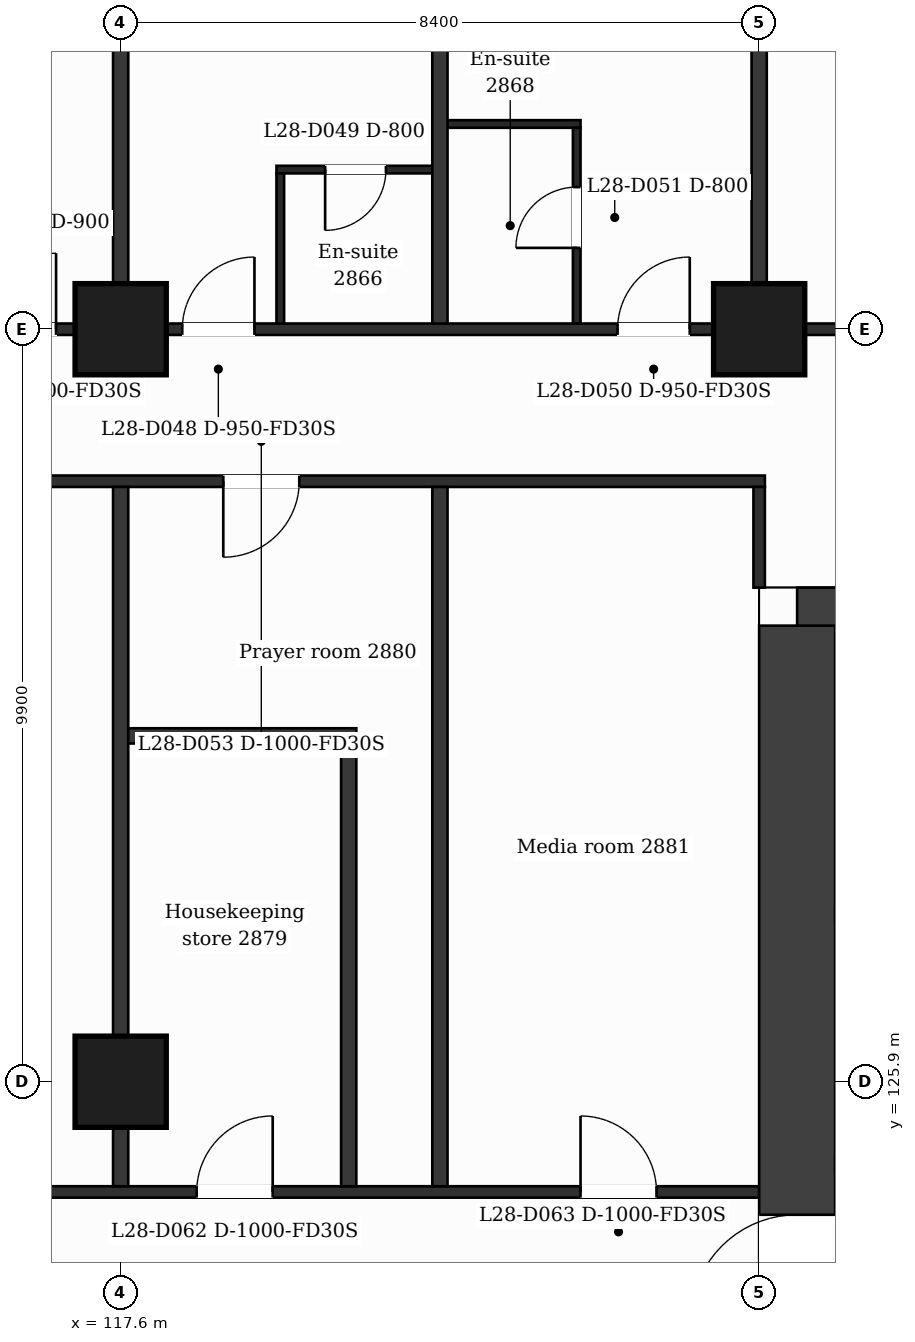
"""IFC4 building model, lengths in metres.
Left out: names, types, materials, properties, quantities, classifications, styles, units other than length and angle.
Written with IfcOpenShell. Run it as: python <this file> out.ifc"""

import sys

from ifc_helpers import new_model, si_unit, direction, frame, frame_2d, origin, origin_2d, place, context, subcontext, project, spatial, rectangle, extrude, element, fill, save


model = new_model("IFC4")
c1 = context("Model", 3, precision=1e-05, world=origin(), true_north=direction((0.0, 1.0)))
c2 = subcontext(c1, "Body", "Model", "MODEL_VIEW")
j1 = project(units=[si_unit("LENGTHUNIT", "METRE"), si_unit("PLANEANGLEUNIT", "RADIAN")], contexts=[c1])
p1 = place(None, origin())
s1 = spatial("IfcSite", under=j1, at=p1, CompositionType="ELEMENT")
p2 = place(p1, origin())
s2 = spatial("IfcBuilding", under=s1, at=p2, CompositionType="ELEMENT")
p3 = place(p2, frame((0.0, 0.0, 120.6)))
s3 = spatial("IfcBuildingStorey", under=s2, at=p3, CompositionType="ELEMENT", Elevation=120.6)
p4 = place(p3, frame((126.5, 131.9, 0.0), z_axis=(0.0, 0.0, 1.0), x_axis=(1.0, 0.0, 0.0)))
e1 = element("IfcWall", 1, at=p4, inside=s3, PredefinedType="SHEAR", context=c2, shape_type="SweptSolid", body=[
    extrude(rectangle(XDim=11.232, YDim=1.0, at=frame_2d((5.616, 0.0))), origin(), (0.0, 0.0, 1.0), 3.7),
])
p5 = place(p4, frame((3.386, 0.0, 0.0)))
e2 = element("IfcOpeningElement", 2, at=p5, cuts=e1, PredefinedType="OPENING", context=c2, shape_type="SweptSolid", body=[
    extrude(rectangle(XDim=1.2, YDim=2.1, at=frame_2d((0.6, 1.05))), frame((0.0, 0.51, 0.0), z_axis=(0.0, -1.0, 0.0), x_axis=(1.0, 0.0, 0.0)), (0.0, 0.0, 1.0), 1.02),
])
p6 = place(p3, frame((126.5, 110.9, 0.0), z_axis=(0.0, 0.0, 1.0), x_axis=(0.0, 1.0, 0.0)))
e3 = element("IfcWall", 3, at=p6, inside=s3, PredefinedType="SHEAR", context=c2, shape_type="SweptSolid", body=[
    extrude(rectangle(XDim=21.0, YDim=1.0, at=frame_2d((10.5, 0.0))), origin(), (0.0, 0.0, 1.0), 3.7),
])
p7 = place(p6, frame((11.85, 0.0, 0.0)))
e4 = element("IfcOpeningElement", 4, at=p7, cuts=e3, PredefinedType="OPENING", context=c2, shape_type="SweptSolid", body=[
    extrude(rectangle(XDim=1.4, YDim=2.1, at=frame_2d((0.7, 1.05))), frame((0.0, 0.51, 0.0), z_axis=(0.0, -1.0, 0.0), x_axis=(1.0, 0.0, 0.0)), (0.0, 0.0, 1.0), 1.02),
])
for number, where, z_axis, x_axis in (
    (5, (117.6, 125.9, 0.0), (0.0, 0.0, 1.0), (1.0, 0.0, 0.0)),
    (6, (117.6, 135.8, 0.0), (0.0, 0.0, 1.0), (1.0, 0.0, 0.0)),
    (7, (126.0, 135.8, 0.0), (0.0, 0.0, 1.0), (1.0, 0.0, 0.0)),
):
    element("IfcColumn", number, at=place(p3, frame(where, z_axis=z_axis, x_axis=x_axis)), inside=s3, PredefinedType="COLUMN", context=c2, shape_type="SweptSolid", body=[
        extrude(rectangle(XDim=1.2, YDim=1.2, at=origin_2d()), origin(), (0.0, 0.0, 1.0), 3.7),
    ])
p8 = place(p3, frame((100.8, 124.45, 0.0), z_axis=(0.0, 0.0, 1.0), x_axis=(1.0, 0.0, 0.0)))
e8 = element("IfcWall", 8, at=p8, inside=s3, PredefinedType="PARTITIONING", context=c2, shape_type="SweptSolid", body=[
    extrude(rectangle(XDim=25.2, YDim=0.15, at=frame_2d((12.6, 0.0))), origin(), (0.0, 0.0, 1.0), 3.38),
])
p9 = place(p8, frame((1.85, 0.0, 0.0)))
e9 = element("IfcOpeningElement", 9, at=p9, cuts=e8, PredefinedType="OPENING", context=c2, shape_type="SweptSolid", body=[
    extrude(rectangle(XDim=1.0, YDim=2.1, at=frame_2d((0.5, 1.05))), frame((0.0, 0.085, 0.0), z_axis=(0.0, -1.0, 0.0), x_axis=(1.0, 0.0, 0.0)), (0.0, 0.0, 1.0), 0.17),
])
p10 = place(p8, frame((6.425, 0.0, 0.0)))
e10 = element("IfcOpeningElement", 10, at=p10, cuts=e8, PredefinedType="OPENING", context=c2, shape_type="SweptSolid", body=[
    extrude(rectangle(XDim=1.0, YDim=2.1, at=frame_2d((0.5, 1.05))), frame((0.0, 0.085, 0.0), z_axis=(0.0, -1.0, 0.0), x_axis=(1.0, 0.0, 0.0)), (0.0, 0.0, 1.0), 0.17),
])
p11 = place(p8, frame((12.77, 0.0, 0.0)))
e11 = element("IfcOpeningElement", 11, at=p11, cuts=e8, PredefinedType="OPENING", context=c2, shape_type="SweptSolid", body=[
    extrude(rectangle(XDim=1.0, YDim=2.1, at=frame_2d((0.5, 1.05))), frame((0.0, 0.085, 0.0), z_axis=(0.0, -1.0, 0.0), x_axis=(1.0, 0.0, 0.0)), (0.0, 0.0, 1.0), 0.17),
])
p12 = place(p8, frame((17.8, 0.0, 0.0)))
e12 = element("IfcOpeningElement", 12, at=p12, cuts=e8, PredefinedType="OPENING", context=c2, shape_type="SweptSolid", body=[
    extrude(rectangle(XDim=1.0, YDim=2.1, at=frame_2d((0.5, 1.05))), frame((0.0, 0.085, 0.0), z_axis=(0.0, -1.0, 0.0), x_axis=(1.0, 0.0, 0.0)), (0.0, 0.0, 1.0), 0.17),
])
p13 = place(p8, frame((22.85, 0.0, 0.0)))
e13 = element("IfcOpeningElement", 13, at=p13, cuts=e8, PredefinedType="OPENING", context=c2, shape_type="SweptSolid", body=[
    extrude(rectangle(XDim=1.0, YDim=2.1, at=frame_2d((0.5, 1.05))), frame((0.0, 0.085, 0.0), z_axis=(0.0, -1.0, 0.0), x_axis=(1.0, 0.0, 0.0)), (0.0, 0.0, 1.0), 0.17),
])
p14 = place(p3, frame((127.0, 124.8, 0.0), z_axis=(0.0, 0.0, 1.0), x_axis=(1.0, 0.0, 0.0)))
e14 = element("IfcWall", 14, at=p14, inside=s3, PredefinedType="PARTITIONING", context=c2, shape_type="SweptSolid", body=[
    extrude(rectangle(XDim=4.649, YDim=0.2, at=frame_2d((2.324, 0.0))), origin(), (0.0, 0.0, 1.0), 3.38),
])
p15 = place(p14, frame((0.743, 0.0, 0.0)))
e15 = element("IfcOpeningElement", 15, at=p15, cuts=e14, PredefinedType="OPENING", context=c2, shape_type="SweptSolid", body=[
    extrude(rectangle(XDim=1.1, YDim=2.1, at=frame_2d((0.55, 1.05))), frame((0.0, 0.11, 0.0), z_axis=(0.0, -1.0, 0.0), x_axis=(1.0, 0.0, 0.0)), (0.0, 0.0, 1.0), 0.22),
])
p16 = place(p3, frame((127.0, 128.1, 0.0), z_axis=(0.0, 0.0, 1.0), x_axis=(1.0, 0.0, 0.0)))
e16 = element("IfcWall", 16, at=p16, inside=s3, PredefinedType="PARTITIONING", context=c2, shape_type="SweptSolid", body=[
    extrude(rectangle(XDim=4.649, YDim=0.2, at=frame_2d((2.324, 0.0))), origin(), (0.0, 0.0, 1.0), 3.38),
])
p17 = place(p16, frame((2.805, 0.0, 0.0)))
e17 = element("IfcOpeningElement", 17, at=p17, cuts=e16, PredefinedType="OPENING", context=c2, shape_type="SweptSolid", body=[
    extrude(rectangle(XDim=1.1, YDim=2.1, at=frame_2d((0.55, 1.05))), frame((0.0, 0.11, 0.0), z_axis=(0.0, -1.0, 0.0), x_axis=(1.0, 0.0, 0.0)), (0.0, 0.0, 1.0), 0.22),
])
p18 = place(p3, frame((117.6, 130.45, 0.0), z_axis=(0.0, 0.0, 1.0), x_axis=(1.0, 0.0, 0.0)))
e18 = element("IfcWall", 18, at=p18, inside=s3, PredefinedType="PARTITIONING", context=c2, shape_type="SweptSolid", body=[
    extrude(rectangle(XDim=3.1, YDim=0.2, at=frame_2d((1.55, 0.0))), origin(), (0.0, 0.0, 1.0), 3.38),
])
p19 = place(p3, frame((100.725, 133.8, 0.0), z_axis=(0.0, 0.0, 1.0), x_axis=(1.0, 0.0, 0.0)))
e19 = element("IfcWall", 19, at=p19, inside=s3, PredefinedType="PARTITIONING", context=c2, shape_type="SweptSolid", body=[
    extrude(rectangle(XDim=25.35, YDim=0.15, at=frame_2d((12.675, 0.0))), origin(), (0.0, 0.0, 1.0), 3.38),
])
p20 = place(p19, frame((18.225, 0.0, 0.0)))
e20 = element("IfcOpeningElement", 20, at=p20, cuts=e19, PredefinedType="OPENING", context=c2, shape_type="SweptSolid", body=[
    extrude(rectangle(XDim=1.0, YDim=2.1, at=frame_2d((0.5, 1.05))), frame((0.0, 0.085, 0.0), z_axis=(0.0, -1.0, 0.0), x_axis=(1.0, 0.0, 0.0)), (0.0, 0.0, 1.0), 0.17),
])
p21 = place(p3, frame((90.895, 135.8, 0.0), z_axis=(0.0, 0.0, 1.0), x_axis=(1.0, 0.0, 0.0)))
e21 = element("IfcWall", 21, at=p21, inside=s3, PredefinedType="PARTITIONING", context=c2, shape_type="SweptSolid", body=[
    extrude(rectangle(XDim=45.011, YDim=0.15, at=frame_2d((22.505, 0.0))), origin(), (0.0, 0.0, 1.0), 3.38),
])
p22 = place(p21, frame((8.005, 0.0, 0.0)))
e22 = element("IfcOpeningElement", 22, at=p22, cuts=e21, PredefinedType="OPENING", context=c2, shape_type="SweptSolid", body=[
    extrude(rectangle(XDim=1.0, YDim=2.1, at=frame_2d((0.5, 1.05))), frame((0.0, 0.085, 0.0), z_axis=(0.0, -1.0, 0.0), x_axis=(1.0, 0.0, 0.0)), (0.0, 0.0, 1.0), 0.17),
])
p23 = place(p21, frame((11.785, 0.0, 0.0)))
e23 = element("IfcOpeningElement", 23, at=p23, cuts=e21, PredefinedType="OPENING", context=c2, shape_type="SweptSolid", body=[
    extrude(rectangle(XDim=0.95, YDim=2.1, at=frame_2d((0.475, 1.05))), frame((0.0, 0.085, 0.0), z_axis=(0.0, -1.0, 0.0), x_axis=(1.0, 0.0, 0.0)), (0.0, 0.0, 1.0), 0.17),
])
p24 = place(p21, frame((14.38, 0.0, 0.0)))
e24 = element("IfcOpeningElement", 24, at=p24, cuts=e21, PredefinedType="OPENING", context=c2, shape_type="SweptSolid", body=[
    extrude(rectangle(XDim=0.95, YDim=2.1, at=frame_2d((0.475, 1.05))), frame((0.0, 0.085, 0.0), z_axis=(0.0, -1.0, 0.0), x_axis=(1.0, 0.0, 0.0)), (0.0, 0.0, 1.0), 0.17),
])
p25 = place(p21, frame((19.075, 0.0, 0.0)))
e25 = element("IfcOpeningElement", 25, at=p25, cuts=e21, PredefinedType="OPENING", context=c2, shape_type="SweptSolid", body=[
    extrude(rectangle(XDim=0.95, YDim=2.1, at=frame_2d((0.475, 1.05))), frame((0.0, 0.085, 0.0), z_axis=(0.0, -1.0, 0.0), x_axis=(1.0, 0.0, 0.0)), (0.0, 0.0, 1.0), 0.17),
])
p26 = place(p21, frame((24.855, 0.0, 0.0)))
e26 = element("IfcOpeningElement", 26, at=p26, cuts=e21, PredefinedType="OPENING", context=c2, shape_type="SweptSolid", body=[
    extrude(rectangle(XDim=1.0, YDim=2.1, at=frame_2d((0.5, 1.05))), frame((0.0, 0.085, 0.0), z_axis=(0.0, -1.0, 0.0), x_axis=(1.0, 0.0, 0.0)), (0.0, 0.0, 1.0), 0.17),
])
p27 = place(p21, frame((27.515, 0.0, 0.0)))
e27 = element("IfcOpeningElement", 27, at=p27, cuts=e21, PredefinedType="OPENING", context=c2, shape_type="SweptSolid", body=[
    extrude(rectangle(XDim=0.95, YDim=2.1, at=frame_2d((0.475, 1.05))), frame((0.0, 0.085, 0.0), z_axis=(0.0, -1.0, 0.0), x_axis=(1.0, 0.0, 0.0)), (0.0, 0.0, 1.0), 0.17),
])
p28 = place(p21, frame((33.242, 0.0, 0.0)))
e28 = element("IfcOpeningElement", 28, at=p28, cuts=e21, PredefinedType="OPENING", context=c2, shape_type="SweptSolid", body=[
    extrude(rectangle(XDim=0.95, YDim=2.1, at=frame_2d((0.475, 1.05))), frame((0.0, 0.085, 0.0), z_axis=(0.0, -1.0, 0.0), x_axis=(1.0, 0.0, 0.0)), (0.0, 0.0, 1.0), 0.17),
])
p29 = place(p21, frame((39.814, 0.0, 0.0)))
e29 = element("IfcOpeningElement", 29, at=p29, cuts=e21, PredefinedType="OPENING", context=c2, shape_type="SweptSolid", body=[
    extrude(rectangle(XDim=0.95, YDim=2.1, at=frame_2d((0.475, 1.05))), frame((0.0, 0.085, 0.0), z_axis=(0.0, -1.0, 0.0), x_axis=(1.0, 0.0, 0.0)), (0.0, 0.0, 1.0), 0.17),
])
p30 = place(p3, frame((119.65, 137.9, 0.0), z_axis=(0.0, 0.0, 1.0), x_axis=(1.0, 0.0, 0.0)))
e30 = element("IfcWall", 30, at=p30, inside=s3, PredefinedType="PARTITIONING", context=c2, shape_type="SweptSolid", body=[
    extrude(rectangle(XDim=2.15, YDim=0.1, at=frame_2d((1.075, 0.0))), origin(), (0.0, 0.0, 1.0), 3.38),
])
p31 = place(p30, frame((0.64, 0.0, 0.0)))
e31 = element("IfcOpeningElement", 31, at=p31, cuts=e30, PredefinedType="OPENING", context=c2, shape_type="SweptSolid", body=[
    extrude(rectangle(XDim=0.8, YDim=2.1, at=frame_2d((0.4, 1.05))), frame((0.0, 0.06, 0.0), z_axis=(0.0, -1.0, 0.0), x_axis=(1.0, 0.0, 0.0)), (0.0, 0.0, 1.0), 0.12),
])
p32 = place(p3, frame((121.8, 138.5, 0.0), z_axis=(0.0, 0.0, 1.0), x_axis=(1.0, 0.0, 0.0)))
e32 = element("IfcWall", 32, at=p32, inside=s3, PredefinedType="PARTITIONING", context=c2, shape_type="SweptSolid", body=[
    extrude(rectangle(XDim=1.85, YDim=0.1, at=frame_2d((0.925, 0.0))), origin(), (0.0, 0.0, 1.0), 3.38),
])
p33 = place(p3, frame((117.6, 124.525, 0.0), z_axis=(0.0, 0.0, 1.0), x_axis=(0.0, 1.0, 0.0)))
e33 = element("IfcWall", 33, at=p33, inside=s3, PredefinedType="PARTITIONING", context=c2, shape_type="SweptSolid", body=[
    extrude(rectangle(XDim=9.2, YDim=0.2, at=frame_2d((4.6, 0.0))), origin(), (0.0, 0.0, 1.0), 3.38),
])
p34 = place(p3, frame((117.6, 135.875, 0.0), z_axis=(0.0, 0.0, 1.0), x_axis=(0.0, 1.0, 0.0)))
e34 = element("IfcWall", 34, at=p34, inside=s3, PredefinedType="PARTITIONING", context=c2, shape_type="SweptSolid", body=[
    extrude(rectangle(XDim=7.135, YDim=0.2, at=frame_2d((3.567, 0.0))), origin(), (0.0, 0.0, 1.0), 3.38),
])
p35 = place(p3, frame((119.7, 135.875, 0.0), z_axis=(0.0, 0.0, 1.0), x_axis=(0.0, 1.0, 0.0)))
e35 = element("IfcWall", 35, at=p35, inside=s3, PredefinedType="PARTITIONING", context=c2, shape_type="SweptSolid", body=[
    extrude(rectangle(XDim=1.975, YDim=0.1, at=frame_2d((0.988, 0.0))), origin(), (0.0, 0.0, 1.0), 3.38),
])
p36 = place(p3, frame((120.6, 124.525, 0.0), z_axis=(0.0, 0.0, 1.0), x_axis=(0.0, 1.0, 0.0)))
e36 = element("IfcWall", 36, at=p36, inside=s3, PredefinedType="PARTITIONING", context=c2, shape_type="SweptSolid", body=[
    extrude(rectangle(XDim=5.825, YDim=0.2, at=frame_2d((2.913, 0.0))), origin(), (0.0, 0.0, 1.0), 3.38),
])
p37 = place(p3, frame((121.8, 124.525, 0.0), z_axis=(0.0, 0.0, 1.0), x_axis=(0.0, 1.0, 0.0)))
e37 = element("IfcWall", 37, at=p37, inside=s3, PredefinedType="PARTITIONING", context=c2, shape_type="SweptSolid", body=[
    extrude(rectangle(XDim=9.2, YDim=0.2, at=frame_2d((4.6, 0.0))), origin(), (0.0, 0.0, 1.0), 3.38),
])
p38 = place(p3, frame((121.8, 135.875, 0.0), z_axis=(0.0, 0.0, 1.0), x_axis=(0.0, 1.0, 0.0)))
e38 = element("IfcWall", 38, at=p38, inside=s3, PredefinedType="PARTITIONING", context=c2, shape_type="SweptSolid", body=[
    extrude(rectangle(XDim=7.135, YDim=0.2, at=frame_2d((3.567, 0.0))), origin(), (0.0, 0.0, 1.0), 3.38),
])
p39 = place(p3, frame((123.6, 135.875, 0.0), z_axis=(0.0, 0.0, 1.0), x_axis=(0.0, 1.0, 0.0)))
e39 = element("IfcWall", 39, at=p39, inside=s3, PredefinedType="PARTITIONING", context=c2, shape_type="SweptSolid", body=[
    extrude(rectangle(XDim=2.575, YDim=0.1, at=frame_2d((1.288, 0.0))), origin(), (0.0, 0.0, 1.0), 3.38),
])
p40 = place(p39, frame((0.995, 0.0, 0.0)))
e40 = element("IfcOpeningElement", 40, at=p40, cuts=e39, PredefinedType="OPENING", context=c2, shape_type="SweptSolid", body=[
    extrude(rectangle(XDim=0.8, YDim=2.1, at=frame_2d((0.4, 1.05))), frame((0.0, 0.06, 0.0), z_axis=(0.0, -1.0, 0.0), x_axis=(1.0, 0.0, 0.0)), (0.0, 0.0, 1.0), 0.12),
])
p41 = place(p3, frame((126.0, 135.875, 0.0), z_axis=(0.0, 0.0, 1.0), x_axis=(0.0, 1.0, 0.0)))
e41 = element("IfcWall", 41, at=p41, inside=s3, PredefinedType="PARTITIONING", context=c2, shape_type="SweptSolid", body=[
    extrude(rectangle(XDim=7.135, YDim=0.2, at=frame_2d((3.567, 0.0))), origin(), (0.0, 0.0, 1.0), 3.38),
])
p42 = place(p3, frame((126.0, 132.4, 0.0), z_axis=(0.0, 0.0, 1.0), x_axis=(0.0, 1.0, 0.0)))
e42 = element("IfcWall", 42, at=p42, inside=s3, PredefinedType="PARTITIONING", context=c2, shape_type="SweptSolid", body=[
    extrude(rectangle(XDim=1.325, YDim=0.15, at=frame_2d((0.663, 0.0))), origin(), (0.0, 0.0, 1.0), 3.38),
])
p43 = place(p26, origin())
e43 = element("IfcDoor", 43, at=p43, inside=s3, OperationType="SINGLE_SWING_RIGHT", PredefinedType="DOOR", context=c2, shape_type="SweptSolid", body=[
    extrude(rectangle(XDim=1.0, YDim=2.1, at=frame_2d((0.5, 1.05))), frame((0.0, 0.025, 0.0), z_axis=(0.0, -1.0, 0.0), x_axis=(1.0, 0.0, 0.0)), (0.0, 0.0, 1.0), 0.05),
])
fill(e26, e43)
p44 = place(p27, origin())
e44 = element("IfcDoor", 44, at=p44, inside=s3, OperationType="SINGLE_SWING_RIGHT", PredefinedType="DOOR", context=c2, shape_type="SweptSolid", body=[
    extrude(rectangle(XDim=0.95, YDim=2.1, at=frame_2d((0.475, 1.05))), frame((0.0, 0.025, 0.0), z_axis=(0.0, -1.0, 0.0), x_axis=(1.0, 0.0, 0.0)), (0.0, 0.0, 1.0), 0.05),
])
fill(e27, e44)
p45 = place(p31, origin())
e45 = element("IfcDoor", 45, at=p45, inside=s3, OperationType="SINGLE_SWING_LEFT", PredefinedType="DOOR", context=c2, shape_type="SweptSolid", body=[
    extrude(rectangle(XDim=0.8, YDim=2.1, at=frame_2d((0.4, 1.05))), frame((0.0, 0.025, 0.0), z_axis=(0.0, -1.0, 0.0), x_axis=(1.0, 0.0, 0.0)), (0.0, 0.0, 1.0), 0.05),
])
fill(e31, e45)
p46 = place(p28, origin())
e46 = element("IfcDoor", 46, at=p46, inside=s3, OperationType="SINGLE_SWING_RIGHT", PredefinedType="DOOR", context=c2, shape_type="SweptSolid", body=[
    extrude(rectangle(XDim=0.95, YDim=2.1, at=frame_2d((0.475, 1.05))), frame((0.0, 0.025, 0.0), z_axis=(0.0, -1.0, 0.0), x_axis=(1.0, 0.0, 0.0)), (0.0, 0.0, 1.0), 0.05),
])
fill(e28, e46)
p47 = place(p40, origin())
e47 = element("IfcDoor", 47, at=p47, inside=s3, OperationType="SINGLE_SWING_LEFT", PredefinedType="DOOR", context=c2, shape_type="SweptSolid", body=[
    extrude(rectangle(XDim=0.8, YDim=2.1, at=frame_2d((0.4, 1.05))), frame((0.0, 0.025, 0.0), z_axis=(0.0, -1.0, 0.0), x_axis=(1.0, 0.0, 0.0)), (0.0, 0.0, 1.0), 0.05),
])
fill(e40, e47)
p48 = place(p20, origin())
e48 = element("IfcDoor", 48, at=p48, inside=s3, OperationType="SINGLE_SWING_LEFT", PredefinedType="DOOR", context=c2, shape_type="SweptSolid", body=[
    extrude(rectangle(XDim=1.0, YDim=2.1, at=frame_2d((0.5, 1.05))), frame((0.0, 0.025, 0.0), z_axis=(0.0, -1.0, 0.0), x_axis=(1.0, 0.0, 0.0)), (0.0, 0.0, 1.0), 0.05),
])
fill(e20, e48)
p49 = place(p12, origin())
e49 = element("IfcDoor", 49, at=p49, inside=s3, OperationType="SINGLE_SWING_RIGHT", PredefinedType="DOOR", context=c2, shape_type="SweptSolid", body=[
    extrude(rectangle(XDim=1.0, YDim=2.1, at=frame_2d((0.5, 1.05))), frame((0.0, 0.025, 0.0), z_axis=(0.0, -1.0, 0.0), x_axis=(1.0, 0.0, 0.0)), (0.0, 0.0, 1.0), 0.05),
])
fill(e12, e49)
p50 = place(p13, origin())
e50 = element("IfcDoor", 50, at=p50, inside=s3, OperationType="SINGLE_SWING_LEFT", PredefinedType="DOOR", context=c2, shape_type="SweptSolid", body=[
    extrude(rectangle(XDim=1.0, YDim=2.1, at=frame_2d((0.5, 1.05))), frame((0.0, 0.025, 0.0), z_axis=(0.0, -1.0, 0.0), x_axis=(1.0, 0.0, 0.0)), (0.0, 0.0, 1.0), 0.05),
])
fill(e13, e50)
p51 = place(p7, origin())
e51 = element("IfcDoor", 51, at=p51, inside=s3, OperationType="SINGLE_SWING_LEFT", PredefinedType="DOOR", context=c2, shape_type="SweptSolid", body=[
    extrude(rectangle(XDim=1.4, YDim=2.1, at=frame_2d((0.7, 1.05))), frame((0.0, 0.025, 0.0), z_axis=(0.0, -1.0, 0.0), x_axis=(1.0, 0.0, 0.0)), (0.0, 0.0, 1.0), 0.05),
])
fill(e4, e51)
save(model, sys.argv[1])
